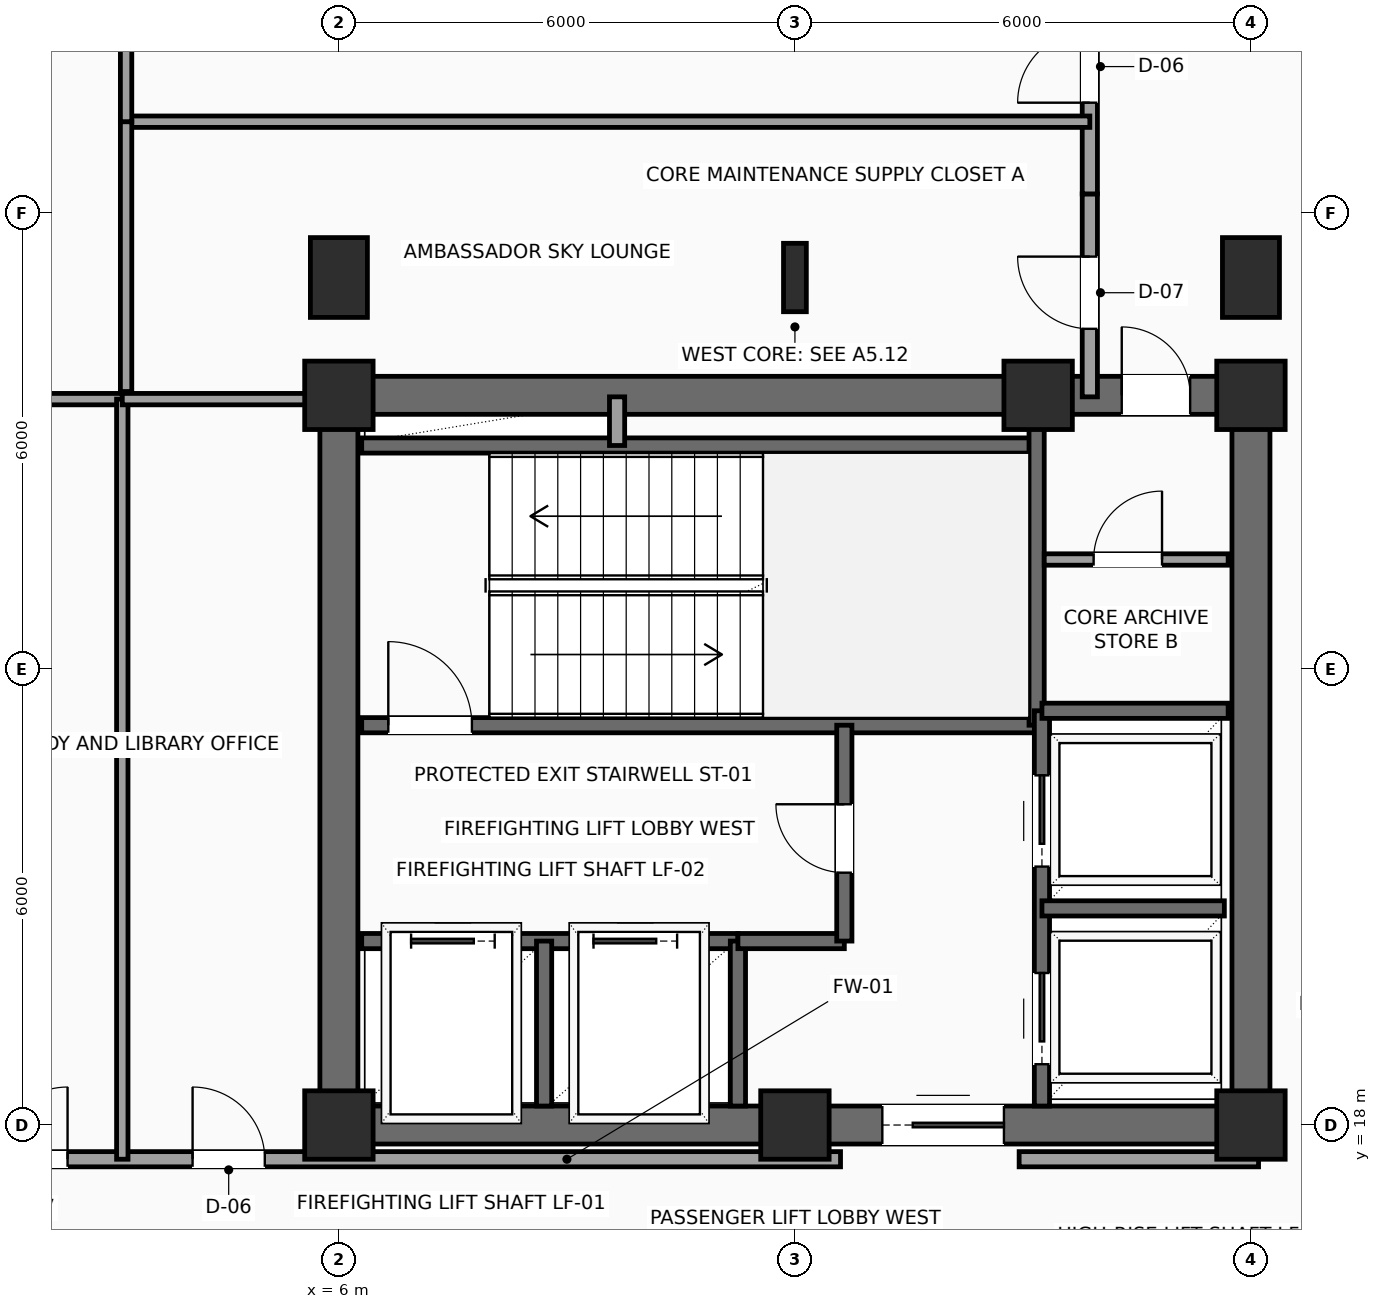
"""IFC4 building model, lengths in metres.
Left out: names, types, materials, properties, quantities, classifications, styles, units other than length and angle.
Written with IfcOpenShell. Run it as: python <this file> out.ifc"""

import sys

from ifc_helpers import new_model, si_unit, direction, frame, frame_2d, origin, origin_2d, place, context, subcontext, project, spatial, rectangle, i_section, extrude, element, fill, save


model = new_model("IFC4")
c1 = context("Model", 3, precision=1e-05, world=origin(), true_north=direction((0.0, 1.0)))
c2 = subcontext(c1, "Body", "Model", "MODEL_VIEW")
j1 = project(units=[si_unit("LENGTHUNIT", "METRE"), si_unit("PLANEANGLEUNIT", "RADIAN")], contexts=[c1])
p1 = place(None, origin())
s1 = spatial("IfcSite", under=j1, at=p1, CompositionType="ELEMENT")
p2 = place(p1, origin())
s2 = spatial("IfcBuilding", under=s1, at=p2, CompositionType="ELEMENT")
p3 = place(p2, frame((0.0, 0.0, 223.65)))
s3 = spatial("IfcBuildingStorey", under=s2, at=p3, CompositionType="ELEMENT", Elevation=223.65)
for number, where, z_axis, x_axis in (
    (1, (6.0, 18.0, 0.0), (0.0, 0.0, 1.0), (1.0, 0.0, 0.0)),
    (2, (12.0, 18.0, 0.0), (0.0, 0.0, 1.0), (1.0, 0.0, 0.0)),
    (3, (18.0, 18.0, 0.0), (0.0, 0.0, 1.0), (1.0, 0.0, 0.0)),
    (4, (6.0, 27.6, 0.0), (0.0, 0.0, 1.0), (1.0, 0.0, 0.0)),
    (5, (15.2, 27.6, 0.0), (0.0, 0.0, 1.0), (1.0, 0.0, 0.0)),
    (6, (18.0, 27.6, 0.0), (0.0, 0.0, 1.0), (1.0, 0.0, 0.0)),
):
    element("IfcColumn", number, at=place(p3, frame(where, z_axis=z_axis, x_axis=x_axis)), inside=s3, PredefinedType="COLUMN", context=c2, shape_type="SweptSolid", body=[
        extrude(rectangle(XDim=0.9, YDim=0.9, at=origin_2d()), origin(), (0.0, 0.0, 1.0), 3.75),
    ])
p4 = place(p3, frame((6.0, 29.15, 0.0), z_axis=(0.0, 0.0, 1.0), x_axis=(1.0, 0.0, 0.0)))
e7 = element("IfcColumn", 7, at=p4, inside=s3, PredefinedType="COLUMN", context=c2, shape_type="SweptSolid", body=[
    extrude(rectangle(XDim=0.75, YDim=1.05, at=origin_2d()), origin(), (0.0, 0.0, 1.0), 3.75),
])
p5 = place(p3, frame((12.0, 29.15, 0.0), z_axis=(0.0, 0.0, 1.0), x_axis=(1.0, 0.0, 0.0)))
e8 = element("IfcColumn", 8, at=p5, inside=s3, PredefinedType="COLUMN", context=c2, shape_type="SweptSolid", body=[
    extrude(i_section(OverallWidth=0.3, OverallDepth=0.9, WebThickness=0.019, FlangeThickness=0.035, FilletRadius=0.03, at=origin_2d()), origin(), (0.0, 0.0, 1.0), 3.75),
])
p6 = place(p3, frame((18.0, 29.15, 0.0), z_axis=(0.0, 0.0, 1.0), x_axis=(1.0, 0.0, 0.0)))
e9 = element("IfcColumn", 9, at=p6, inside=s3, PredefinedType="COLUMN", context=c2, shape_type="SweptSolid", body=[
    extrude(rectangle(XDim=0.75, YDim=1.05, at=origin_2d()), origin(), (0.0, 0.0, 1.0), 3.75),
])
p7 = place(p3, frame((6.0, 18.0, 0.0), z_axis=(0.0, 0.0, 1.0), x_axis=(1.0, 0.0, 0.0)))
e10 = element("IfcWall", 10, at=p7, inside=s3, PredefinedType="SHEAR", context=c2, shape_type="SweptSolid", body=[
    extrude(rectangle(XDim=12.0, YDim=0.5, at=frame_2d((6.0, 0.0))), origin(), (0.0, 0.0, 1.0), 3.54),
])
p8 = place(p7, frame((7.15, 0.0, 0.0)))
e11 = element("IfcOpeningElement", 11, at=p8, cuts=e10, PredefinedType="OPENING", context=c2, shape_type="SweptSolid", body=[
    extrude(rectangle(XDim=1.6, YDim=2.3, at=frame_2d((0.8, 1.15))), frame((0.0, 0.26, 0.0), z_axis=(0.0, -1.0, 0.0), x_axis=(1.0, 0.0, 0.0)), (0.0, 0.0, 1.0), 0.52),
])
p9 = place(p3, frame((6.0, 27.6, 0.0), z_axis=(0.0, 0.0, 1.0), x_axis=(1.0, 0.0, 0.0)))
e12 = element("IfcWall", 12, at=p9, inside=s3, PredefinedType="SHEAR", context=c2, shape_type="SweptSolid", body=[
    extrude(rectangle(XDim=12.0, YDim=0.5, at=frame_2d((6.0, 0.0))), origin(), (0.0, 0.0, 1.0), 3.54),
])
p10 = place(p9, frame((10.3, 0.0, 0.0)))
e13 = element("IfcOpeningElement", 13, at=p10, cuts=e12, PredefinedType="OPENING", context=c2, shape_type="SweptSolid", body=[
    extrude(rectangle(XDim=0.9, YDim=2.15, at=frame_2d((0.45, 1.075))), frame((0.0, 0.26, 0.0), z_axis=(0.0, -1.0, 0.0), x_axis=(1.0, 0.0, 0.0)), (0.0, 0.0, 1.0), 0.52),
])
for number, where, z_axis, x_axis in (
    (14, (6.0, 18.0, 0.0), (0.0, 0.0, 1.0), (0.0, 1.0, 0.0)),
    (15, (18.0, 18.0, 0.0), (0.0, 0.0, 1.0), (0.0, 1.0, 0.0)),
):
    element("IfcWall", number, at=place(p3, frame(where, z_axis=z_axis, x_axis=x_axis)), inside=s3, PredefinedType="SHEAR", context=c2, shape_type="SweptSolid", body=[
        extrude(rectangle(XDim=9.6, YDim=0.5, at=frame_2d((4.8, 0.0))), origin(), (0.0, 0.0, 1.0), 3.54),
    ])
p11 = place(p3, frame((6.3, 23.26, 0.0), z_axis=(0.0, 0.0, 1.0), x_axis=(1.0, 0.0, 0.0)))
e16 = element("IfcWall", 16, at=p11, inside=s3, PredefinedType="SHEAR", context=c2, shape_type="SweptSolid", body=[
    extrude(rectangle(XDim=8.88, YDim=0.2, at=frame_2d((4.44, 0.0))), origin(), (0.0, 0.0, 1.0), 3.54),
])
p12 = place(p11, frame((0.35, 0.0, 0.0)))
e17 = element("IfcOpeningElement", 17, at=p12, cuts=e16, PredefinedType="OPENING", context=c2, shape_type="SweptSolid", body=[
    extrude(rectangle(XDim=1.1, YDim=2.2, at=frame_2d((0.55, 1.1))), frame((0.0, 0.11, 0.0), z_axis=(0.0, -1.0, 0.0), x_axis=(1.0, 0.0, 0.0)), (0.0, 0.0, 1.0), 0.22),
])
p13 = place(p3, frame((6.3, 26.94, 0.0), z_axis=(0.0, 0.0, 1.0), x_axis=(1.0, 0.0, 0.0)))
e18 = element("IfcWall", 18, at=p13, inside=s3, PredefinedType="SHEAR", context=c2, shape_type="SweptSolid", body=[
    extrude(rectangle(XDim=8.88, YDim=0.2, at=frame_2d((4.44, 0.0))), origin(), (0.0, 0.0, 1.0), 3.54),
])
p14 = place(p3, frame((15.18, 23.26, 0.0), z_axis=(0.0, 0.0, 1.0), x_axis=(0.0, 1.0, 0.0)))
e19 = element("IfcWall", 19, at=p14, inside=s3, PredefinedType="SHEAR", context=c2, shape_type="SweptSolid", body=[
    extrude(rectangle(XDim=4.04, YDim=0.2, at=frame_2d((2.02, 0.0))), origin(), (0.0, 0.0, 1.0), 3.54),
])
p15 = place(p3, frame((6.3, 20.42, 0.0), z_axis=(0.0, 0.0, 1.0), x_axis=(1.0, 0.0, 0.0)))
e20 = element("IfcWall", 20, at=p15, inside=s3, PredefinedType="SHEAR", context=c2, shape_type="SweptSolid", body=[
    extrude(rectangle(XDim=4.95, YDim=0.2, at=frame_2d((2.475, 0.0))), origin(), (0.0, 0.0, 1.0), 3.54),
])
p16 = place(p15, frame((0.65, 0.0, 0.0)))
e21 = element("IfcOpeningElement", 21, at=p16, cuts=e20, PredefinedType="OPENING", context=c2, shape_type="SweptSolid", body=[
    extrude(rectangle(XDim=1.1, YDim=2.2, at=frame_2d((0.55, 1.1))), frame((0.0, 0.11, 0.0), z_axis=(0.0, -1.0, 0.0), x_axis=(1.0, 0.0, 0.0)), (0.0, 0.0, 1.0), 0.22),
])
p17 = place(p15, frame((3.05, 0.0, 0.0)))
e22 = element("IfcOpeningElement", 22, at=p17, cuts=e20, PredefinedType="OPENING", context=c2, shape_type="SweptSolid", body=[
    extrude(rectangle(XDim=1.1, YDim=2.2, at=frame_2d((0.55, 1.1))), frame((0.0, 0.11, 0.0), z_axis=(0.0, -1.0, 0.0), x_axis=(1.0, 0.0, 0.0)), (0.0, 0.0, 1.0), 0.22),
])
for number, where, z_axis, x_axis in (
    (23, (8.7, 18.25, 0.0), (0.0, 0.0, 1.0), (0.0, 1.0, 0.0)),
    (24, (11.25, 18.25, 0.0), (0.0, 0.0, 1.0), (0.0, 1.0, 0.0)),
):
    element("IfcWall", number, at=place(p3, frame(where, z_axis=z_axis, x_axis=x_axis)), inside=s3, PredefinedType="SHEAR", context=c2, shape_type="SweptSolid", body=[
        extrude(rectangle(XDim=2.17, YDim=0.2, at=frame_2d((1.085, 0.0))), origin(), (0.0, 0.0, 1.0), 3.54),
    ])
p18 = place(p3, frame((11.25, 20.42, 0.0), z_axis=(0.0, 0.0, 1.0), x_axis=(1.0, 0.0, 0.0)))
e25 = element("IfcWall", 25, at=p18, inside=s3, PredefinedType="SHEAR", context=c2, shape_type="SweptSolid", body=[
    extrude(rectangle(XDim=1.4, YDim=0.2, at=frame_2d((0.7, 0.0))), origin(), (0.0, 0.0, 1.0), 3.54),
])
p19 = place(p3, frame((12.65, 20.42, 0.0), z_axis=(0.0, 0.0, 1.0), x_axis=(0.0, 1.0, 0.0)))
e26 = element("IfcWall", 26, at=p19, inside=s3, PredefinedType="SHEAR", context=c2, shape_type="SweptSolid", body=[
    extrude(rectangle(XDim=2.84, YDim=0.2, at=frame_2d((1.42, 0.0))), origin(), (0.0, 0.0, 1.0), 3.54),
])
p20 = place(p19, frame((0.9, 0.0, 0.0)))
e27 = element("IfcOpeningElement", 27, at=p20, cuts=e26, PredefinedType="OPENING", context=c2, shape_type="SweptSolid", body=[
    extrude(rectangle(XDim=0.9, YDim=2.15, at=frame_2d((0.45, 1.075))), frame((0.0, 0.11, 0.0), z_axis=(0.0, -1.0, 0.0), x_axis=(1.0, 0.0, 0.0)), (0.0, 0.0, 1.0), 0.22),
])
p21 = place(p3, frame((9.66, 26.94, 0.0), z_axis=(0.0, 0.0, 1.0), x_axis=(0.0, 1.0, 0.0)))
e28 = element("IfcWall", 28, at=p21, inside=s3, PredefinedType="SOLIDWALL", context=c2, shape_type="SweptSolid", body=[
    extrude(rectangle(XDim=0.64, YDim=0.2, at=frame_2d((0.32, 0.0))), origin(), (0.0, 0.0, 1.0), 3.54),
])
p22 = place(p3, frame((15.25, 18.25, 0.0), z_axis=(0.0, 0.0, 1.0), x_axis=(0.0, 1.0, 0.0)))
e29 = element("IfcWall", 29, at=p22, inside=s3, PredefinedType="SHEAR", context=c2, shape_type="SweptSolid", body=[
    extrude(rectangle(XDim=5.2, YDim=0.2, at=frame_2d((2.6, 0.0))), origin(), (0.0, 0.0, 1.0), 3.54),
])
p23 = place(p22, frame((0.55, 0.0, 0.0)))
e30 = element("IfcOpeningElement", 30, at=p23, cuts=e29, PredefinedType="OPENING", context=c2, shape_type="SweptSolid", body=[
    extrude(rectangle(XDim=1.2, YDim=2.2, at=frame_2d((0.6, 1.1))), frame((0.0, 0.11, 0.0), z_axis=(0.0, -1.0, 0.0), x_axis=(1.0, 0.0, 0.0)), (0.0, 0.0, 1.0), 0.22),
])
p24 = place(p22, frame((3.15, 0.0, 0.0)))
e31 = element("IfcOpeningElement", 31, at=p24, cuts=e29, PredefinedType="OPENING", context=c2, shape_type="SweptSolid", body=[
    extrude(rectangle(XDim=1.2, YDim=2.2, at=frame_2d((0.6, 1.1))), frame((0.0, 0.11, 0.0), z_axis=(0.0, -1.0, 0.0), x_axis=(1.0, 0.0, 0.0)), (0.0, 0.0, 1.0), 0.22),
])
p25 = place(p3, frame((15.25, 20.85, 0.0), z_axis=(0.0, 0.0, 1.0), x_axis=(1.0, 0.0, 0.0)))
e32 = element("IfcWall", 32, at=p25, inside=s3, PredefinedType="SHEAR", context=c2, shape_type="SweptSolid", body=[
    extrude(rectangle(XDim=2.4, YDim=0.2, at=frame_2d((1.2, 0.0))), origin(), (0.0, 0.0, 1.0), 3.54),
])
p26 = place(p3, frame((15.25, 23.45, 0.0), z_axis=(0.0, 0.0, 1.0), x_axis=(1.0, 0.0, 0.0)))
e33 = element("IfcWall", 33, at=p26, inside=s3, PredefinedType="SHEAR", context=c2, shape_type="SweptSolid", body=[
    extrude(rectangle(XDim=2.45, YDim=0.2, at=frame_2d((1.225, 0.0))), origin(), (0.0, 0.0, 1.0), 3.54),
])
p27 = place(p3, frame((15.28, 25.44, 0.0), z_axis=(0.0, 0.0, 1.0), x_axis=(1.0, 0.0, 0.0)))
e34 = element("IfcWall", 34, at=p27, inside=s3, PredefinedType="PARTITIONING", context=c2, shape_type="SweptSolid", body=[
    extrude(rectangle(XDim=2.42, YDim=0.15, at=frame_2d((1.21, 0.0))), origin(), (0.0, 0.0, 1.0), 3.54),
])
p28 = place(p27, frame((0.65, 0.0, 0.0)))
e35 = element("IfcOpeningElement", 35, at=p28, cuts=e34, PredefinedType="OPENING", context=c2, shape_type="SweptSolid", body=[
    extrude(rectangle(XDim=0.9, YDim=2.15, at=frame_2d((0.45, 1.075))), frame((0.0, 0.085, 0.0), z_axis=(0.0, -1.0, 0.0), x_axis=(1.0, 0.0, 0.0)), (0.0, 0.0, 1.0), 0.17),
])
p29 = place(p3, frame((0.3, 17.55, 0.0), z_axis=(0.0, 0.0, 1.0), x_axis=(1.0, 0.0, 0.0)))
e36 = element("IfcWall", 36, at=p29, inside=s3, PredefinedType="SOLIDWALL", context=c2, shape_type="SweptSolid", body=[
    extrude(rectangle(XDim=12.3, YDim=0.2, at=frame_2d((6.15, 0.0))), origin(), (0.0, 0.0, 1.0), 3.54),
])
p30 = place(p29, frame((1.18, 0.0, 0.0)))
e37 = element("IfcOpeningElement", 37, at=p30, cuts=e36, PredefinedType="OPENING", context=c2, shape_type="SweptSolid", body=[
    extrude(rectangle(XDim=0.95, YDim=2.15, at=frame_2d((0.475, 1.075))), frame((0.0, 0.11, 0.0), z_axis=(0.0, -1.0, 0.0), x_axis=(1.0, 0.0, 0.0)), (0.0, 0.0, 1.0), 0.22),
])
p31 = place(p29, frame((3.775, 0.0, 0.0)))
e38 = element("IfcOpeningElement", 38, at=p31, cuts=e36, PredefinedType="OPENING", context=c2, shape_type="SweptSolid", body=[
    extrude(rectangle(XDim=0.95, YDim=2.15, at=frame_2d((0.475, 1.075))), frame((0.0, 0.11, 0.0), z_axis=(0.0, -1.0, 0.0), x_axis=(1.0, 0.0, 0.0)), (0.0, 0.0, 1.0), 0.22),
])
p32 = place(p3, frame((14.95, 17.55, 0.0), z_axis=(0.0, 0.0, 1.0), x_axis=(1.0, 0.0, 0.0)))
e39 = element("IfcWall", 39, at=p32, inside=s3, PredefinedType="SOLIDWALL", context=c2, shape_type="SweptSolid", body=[
    extrude(rectangle(XDim=3.15, YDim=0.2, at=frame_2d((1.575, 0.0))), origin(), (0.0, 0.0, 1.0), 3.54),
])
p33 = place(p3, frame((15.88, 27.58, 0.0), z_axis=(0.0, 0.0, 1.0), x_axis=(0.0, 1.0, 0.0)))
e40 = element("IfcWall", 40, at=p33, inside=s3, PredefinedType="SOLIDWALL", context=c2, shape_type="SweptSolid", body=[
    extrude(rectangle(XDim=2.67, YDim=0.2, at=frame_2d((1.335, 0.0))), origin(), (0.0, 0.0, 1.0), 3.54),
])
p34 = place(p33, frame((0.895, 0.0, 0.0)))
e41 = element("IfcOpeningElement", 41, at=p34, cuts=e40, PredefinedType="OPENING", context=c2, shape_type="SweptSolid", body=[
    extrude(rectangle(XDim=0.95, YDim=2.15, at=frame_2d((0.475, 1.075))), frame((0.0, 0.11, 0.0), z_axis=(0.0, -1.0, 0.0), x_axis=(1.0, 0.0, 0.0)), (0.0, 0.0, 1.0), 0.22),
])
p35 = place(p3, frame((15.88, 30.25, 0.0), z_axis=(0.0, 0.0, 1.0), x_axis=(0.0, 1.0, 0.0)))
e42 = element("IfcWall", 42, at=p35, inside=s3, PredefinedType="SOLIDWALL", context=c2, shape_type="SweptSolid", body=[
    extrude(rectangle(XDim=2.4, YDim=0.2, at=frame_2d((1.2, 0.0))), origin(), (0.0, 0.0, 1.0), 3.54),
])
p36 = place(p35, frame((1.2, 0.0, 0.0)))
e43 = element("IfcOpeningElement", 43, at=p36, cuts=e42, PredefinedType="OPENING", context=c2, shape_type="SweptSolid", body=[
    extrude(rectangle(XDim=0.95, YDim=2.15, at=frame_2d((0.475, 1.075))), frame((0.0, 0.11, 0.0), z_axis=(0.0, -1.0, 0.0), x_axis=(1.0, 0.0, 0.0)), (0.0, 0.0, 1.0), 0.22),
])
p37 = place(p3, frame((0.3, 27.55, 0.0), z_axis=(0.0, 0.0, 1.0), x_axis=(1.0, 0.0, 0.0)))
e44 = element("IfcWall", 44, at=p37, inside=s3, PredefinedType="PARTITIONING", context=c2, shape_type="SweptSolid", body=[
    extrude(rectangle(XDim=2.85, YDim=0.15, at=frame_2d((1.425, 0.0))), origin(), (0.0, 0.0, 1.0), 3.54),
])
p38 = place(p3, frame((3.15, 17.55, 0.0), z_axis=(0.0, 0.0, 1.0), x_axis=(0.0, 1.0, 0.0)))
e45 = element("IfcWall", 45, at=p38, inside=s3, PredefinedType="PARTITIONING", context=c2, shape_type="SweptSolid", body=[
    extrude(rectangle(XDim=10.0, YDim=0.15, at=frame_2d((5.0, 0.0))), origin(), (0.0, 0.0, 1.0), 3.54),
])
p39 = place(p3, frame((3.15, 27.55, 0.0), z_axis=(0.0, 0.0, 1.0), x_axis=(1.0, 0.0, 0.0)))
e46 = element("IfcWall", 46, at=p39, inside=s3, PredefinedType="PARTITIONING", context=c2, shape_type="SweptSolid", body=[
    extrude(rectangle(XDim=2.8, YDim=0.15, at=frame_2d((1.4, 0.0))), origin(), (0.0, 0.0, 1.0), 3.54),
])
p40 = place(p3, frame((3.2, 31.2, 0.0), z_axis=(0.0, 0.0, 1.0), x_axis=(1.0, 0.0, 0.0)))
e47 = element("IfcWall", 47, at=p40, inside=s3, PredefinedType="PARTITIONING", context=c2, shape_type="SweptSolid", body=[
    extrude(rectangle(XDim=12.68, YDim=0.15, at=frame_2d((6.34, 0.0))), origin(), (0.0, 0.0, 1.0), 3.54),
])
p41 = place(p3, frame((3.2, 27.65, 0.0), z_axis=(0.0, 0.0, 1.0), x_axis=(0.0, 1.0, 0.0)))
e48 = element("IfcWall", 48, at=p41, inside=s3, PredefinedType="PARTITIONING", context=c2, shape_type="SweptSolid", body=[
    extrude(rectangle(XDim=3.55, YDim=0.15, at=frame_2d((1.775, 0.0))), origin(), (0.0, 0.0, 1.0), 3.54),
])
p42 = place(p3, frame((3.2, 31.2, 0.0), z_axis=(0.0, 0.0, 1.0), x_axis=(0.0, 1.0, 0.0)))
e49 = element("IfcWall", 49, at=p42, inside=s3, PredefinedType="PARTITIONING", context=c2, shape_type="SweptSolid", body=[
    extrude(rectangle(XDim=4.5, YDim=0.15, at=frame_2d((2.25, 0.0))), origin(), (0.0, 0.0, 1.0), 3.54),
])
p43 = place(p8, origin())
e50 = element("IfcDoor", 50, at=p43, inside=s3, OperationType="DOUBLE_DOOR_SLIDING", PredefinedType="DOOR", context=c2, shape_type="SweptSolid", body=[
    extrude(rectangle(XDim=1.6, YDim=2.3, at=frame_2d((0.8, 1.15))), frame((0.0, 0.025, 0.0), z_axis=(0.0, -1.0, 0.0), x_axis=(1.0, 0.0, 0.0)), (0.0, 0.0, 1.0), 0.05),
])
fill(e11, e50)
p44 = place(p10, origin())
e51 = element("IfcDoor", 51, at=p44, inside=s3, OperationType="SINGLE_SWING_LEFT", PredefinedType="DOOR", context=c2, shape_type="SweptSolid", body=[
    extrude(rectangle(XDim=0.9, YDim=2.15, at=frame_2d((0.45, 1.075))), frame((0.0, 0.025, 0.0), z_axis=(0.0, -1.0, 0.0), x_axis=(1.0, 0.0, 0.0)), (0.0, 0.0, 1.0), 0.05),
])
fill(e13, e51)
p45 = place(p12, origin())
e52 = element("IfcDoor", 52, at=p45, inside=s3, OperationType="SINGLE_SWING_LEFT", PredefinedType="DOOR", context=c2, shape_type="SweptSolid", body=[
    extrude(rectangle(XDim=1.1, YDim=2.2, at=frame_2d((0.55, 1.1))), frame((0.0, 0.025, 0.0), z_axis=(0.0, -1.0, 0.0), x_axis=(1.0, 0.0, 0.0)), (0.0, 0.0, 1.0), 0.05),
])
fill(e17, e52)
p46 = place(p16, origin())
e53 = element("IfcDoor", 53, at=p46, inside=s3, OperationType="SLIDING_TO_LEFT", PredefinedType="DOOR", context=c2, shape_type="SweptSolid", body=[
    extrude(rectangle(XDim=1.1, YDim=2.2, at=frame_2d((0.55, 1.1))), frame((0.0, 0.025, 0.0), z_axis=(0.0, -1.0, 0.0), x_axis=(1.0, 0.0, 0.0)), (0.0, 0.0, 1.0), 0.05),
])
fill(e21, e53)
p47 = place(p17, origin())
e54 = element("IfcDoor", 54, at=p47, inside=s3, OperationType="SLIDING_TO_LEFT", PredefinedType="DOOR", context=c2, shape_type="SweptSolid", body=[
    extrude(rectangle(XDim=1.1, YDim=2.2, at=frame_2d((0.55, 1.1))), frame((0.0, 0.025, 0.0), z_axis=(0.0, -1.0, 0.0), x_axis=(1.0, 0.0, 0.0)), (0.0, 0.0, 1.0), 0.05),
])
fill(e22, e54)
p48 = place(p20, origin())
e55 = element("IfcDoor", 55, at=p48, inside=s3, OperationType="SINGLE_SWING_RIGHT", PredefinedType="DOOR", context=c2, shape_type="SweptSolid", body=[
    extrude(rectangle(XDim=0.9, YDim=2.15, at=frame_2d((0.45, 1.075))), frame((0.0, 0.025, 0.0), z_axis=(0.0, -1.0, 0.0), x_axis=(1.0, 0.0, 0.0)), (0.0, 0.0, 1.0), 0.05),
])
fill(e27, e55)
p49 = place(p23, origin())
e56 = element("IfcDoor", 56, at=p49, inside=s3, OperationType="SLIDING_TO_RIGHT", PredefinedType="DOOR", context=c2, shape_type="SweptSolid", body=[
    extrude(rectangle(XDim=1.2, YDim=2.2, at=frame_2d((0.6, 1.1))), frame((0.0, 0.025, 0.0), z_axis=(0.0, -1.0, 0.0), x_axis=(1.0, 0.0, 0.0)), (0.0, 0.0, 1.0), 0.05),
])
fill(e30, e56)
p50 = place(p24, origin())
e57 = element("IfcDoor", 57, at=p50, inside=s3, OperationType="SLIDING_TO_RIGHT", PredefinedType="DOOR", context=c2, shape_type="SweptSolid", body=[
    extrude(rectangle(XDim=1.2, YDim=2.2, at=frame_2d((0.6, 1.1))), frame((0.0, 0.025, 0.0), z_axis=(0.0, -1.0, 0.0), x_axis=(1.0, 0.0, 0.0)), (0.0, 0.0, 1.0), 0.05),
])
fill(e31, e57)
p51 = place(p28, origin())
e58 = element("IfcDoor", 58, at=p51, inside=s3, OperationType="SINGLE_SWING_RIGHT", PredefinedType="DOOR", context=c2, shape_type="SweptSolid", body=[
    extrude(rectangle(XDim=0.9, YDim=2.15, at=frame_2d((0.45, 1.075))), frame((0.0, 0.025, 0.0), z_axis=(0.0, -1.0, 0.0), x_axis=(1.0, 0.0, 0.0)), (0.0, 0.0, 1.0), 0.05),
])
fill(e35, e58)
p52 = place(p30, origin())
e59 = element("IfcDoor", 59, at=p52, inside=s3, OperationType="SINGLE_SWING_RIGHT", PredefinedType="DOOR", context=c2, shape_type="SweptSolid", body=[
    extrude(rectangle(XDim=0.95, YDim=2.15, at=frame_2d((0.475, 1.075))), frame((0.0, 0.025, 0.0), z_axis=(0.0, -1.0, 0.0), x_axis=(1.0, 0.0, 0.0)), (0.0, 0.0, 1.0), 0.05),
])
fill(e37, e59)
p53 = place(p31, origin())
e60 = element("IfcDoor", 60, at=p53, inside=s3, OperationType="SINGLE_SWING_LEFT", PredefinedType="DOOR", context=c2, shape_type="SweptSolid", body=[
    extrude(rectangle(XDim=0.95, YDim=2.15, at=frame_2d((0.475, 1.075))), frame((0.0, 0.025, 0.0), z_axis=(0.0, -1.0, 0.0), x_axis=(1.0, 0.0, 0.0)), (0.0, 0.0, 1.0), 0.05),
])
fill(e38, e60)
p54 = place(p34, origin())
e61 = element("IfcDoor", 61, at=p54, inside=s3, OperationType="SINGLE_SWING_RIGHT", PredefinedType="DOOR", context=c2, shape_type="SweptSolid", body=[
    extrude(rectangle(XDim=0.95, YDim=2.15, at=frame_2d((0.475, 1.075))), frame((0.0, 0.025, 0.0), z_axis=(0.0, -1.0, 0.0), x_axis=(1.0, 0.0, 0.0)), (0.0, 0.0, 1.0), 0.05),
])
fill(e41, e61)
p55 = place(p36, origin())
e62 = element("IfcDoor", 62, at=p55, inside=s3, OperationType="SINGLE_SWING_LEFT", PredefinedType="DOOR", context=c2, shape_type="SweptSolid", body=[
    extrude(rectangle(XDim=0.95, YDim=2.15, at=frame_2d((0.475, 1.075))), frame((0.0, 0.025, 0.0), z_axis=(0.0, -1.0, 0.0), x_axis=(1.0, 0.0, 0.0)), (0.0, 0.0, 1.0), 0.05),
])
fill(e43, e62)
save(model, sys.argv[1])
